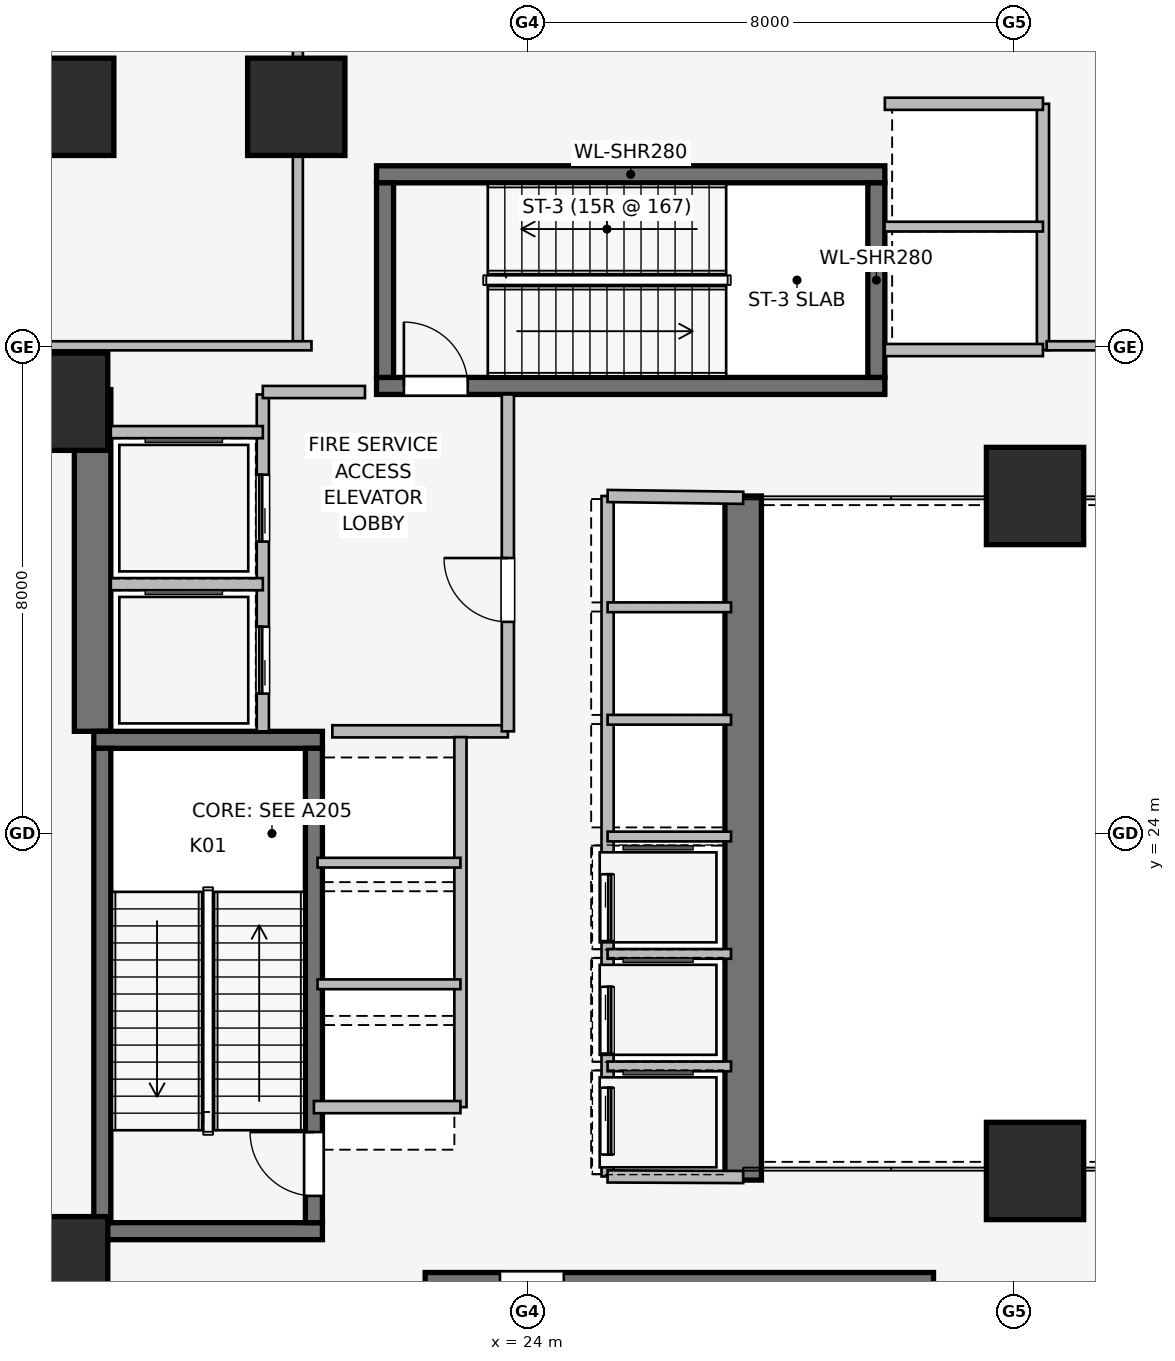
"""IFC4 building model, lengths in metres.
Left out: names, types, materials, properties, quantities, classifications, styles, units other than length and angle.
Written with IfcOpenShell. Run it as: python <this file> out.ifc"""

import sys

from ifc_helpers import new_model, si_unit, direction, frame, frame_2d, origin, origin_2d, place, context, subcontext, project, spatial, rectangle, extrude, element, fill, save


model = new_model("IFC4")
c1 = context("Model", 3, precision=1e-05, world=origin(), true_north=direction((0.0, 1.0)))
c2 = subcontext(c1, "Body", "Model", "MODEL_VIEW")
j1 = project(units=[si_unit("LENGTHUNIT", "METRE"), si_unit("PLANEANGLEUNIT", "RADIAN")], contexts=[c1])
p1 = place(None, origin())
s1 = spatial("IfcSite", under=j1, at=p1, CompositionType="ELEMENT")
p2 = place(p1, origin())
s2 = spatial("IfcBuilding", under=s1, at=p2, CompositionType="ELEMENT")
p3 = place(p2, frame((0.0, 0.0, 11.0)))
s3 = spatial("IfcBuildingStorey", under=s2, at=p3, CompositionType="ELEMENT", Elevation=11.0)
p4 = place(p3, frame((16.85, 25.68, 0.0), z_axis=(0.0, 0.0, 1.0), x_axis=(0.0, 1.0, 0.0)))
e1 = element("IfcWall", 1, at=p4, inside=s3, PredefinedType="SHEAR", context=c2, shape_type="SweptSolid", body=[
    extrude(rectangle(XDim=5.62, YDim=0.6, at=frame_2d((2.81, 0.0))), origin(), (0.0, 0.0, 1.0), 5.0),
])
p5 = place(p3, frame((27.55, 29.55, 0.0), z_axis=(0.0, 0.0, 1.0), x_axis=(0.0, -1.0, 0.0)))
e2 = element("IfcWall", 2, at=p5, inside=s3, PredefinedType="SHEAR", context=c2, shape_type="SweptSolid", body=[
    extrude(rectangle(XDim=11.25, YDim=0.6, at=frame_2d((5.625, 0.0))), origin(), (0.0, 0.0, 1.0), 5.0),
])
for number, where, z_axis, x_axis in (
    (3, (16.87, 17.46, 0.0), (0.0, 0.0, 1.0), (1.0, 0.0, 0.0)),
    (4, (20.63, 25.54, 0.0), (0.0, 0.0, 1.0), (-1.0, 0.0, 0.0)),
):
    element("IfcWall", number, at=place(p3, frame(where, z_axis=z_axis, x_axis=x_axis)), inside=s3, PredefinedType="SHEAR", context=c2, shape_type="SweptSolid", body=[
        extrude(rectangle(XDim=3.76, YDim=0.28, at=frame_2d((1.88, 0.0))), origin(), (0.0, 0.0, 1.0), 5.0),
    ])
p6 = place(p3, frame((17.01, 25.4, 0.0), z_axis=(0.0, 0.0, 1.0), x_axis=(0.0, -1.0, 0.0)))
e5 = element("IfcWall", 5, at=p6, inside=s3, PredefinedType="SHEAR", context=c2, shape_type="SweptSolid", body=[
    extrude(rectangle(XDim=7.8, YDim=0.28, at=frame_2d((3.9, 0.0))), origin(), (0.0, 0.0, 1.0), 5.0),
])
p7 = place(p3, frame((20.49, 17.6, 0.0), z_axis=(0.0, 0.0, 1.0), x_axis=(0.0, 1.0, 0.0)))
e6 = element("IfcWall", 6, at=p7, inside=s3, PredefinedType="SHEAR", context=c2, shape_type="SweptSolid", body=[
    extrude(rectangle(XDim=7.8, YDim=0.28, at=frame_2d((3.9, 0.0))), origin(), (0.0, 0.0, 1.0), 5.0),
])
p8 = place(p7, frame((0.44, 0.0, 0.0)))
e7 = element("IfcOpeningElement", 7, at=p8, cuts=e6, PredefinedType="OPENING", context=c2, shape_type="SweptSolid", body=[
    extrude(rectangle(XDim=1.05, YDim=2.0, at=frame_2d((0.525, 1.0))), frame((0.0, 0.15, 0.0), z_axis=(0.0, -1.0, 0.0), x_axis=(1.0, 0.0, 0.0)), (0.0, 0.0, 1.0), 0.3),
])
p9 = place(p3, frame((30.68, 16.64, 0.0), z_axis=(0.0, 0.0, 1.0), x_axis=(-1.0, 0.0, 0.0)))
e8 = element("IfcWall", 8, at=p9, inside=s3, PredefinedType="SHEAR", context=c2, shape_type="SweptSolid", body=[
    extrude(rectangle(XDim=8.36, YDim=0.28, at=frame_2d((4.18, 0.0))), origin(), (0.0, 0.0, 1.0), 5.0),
])
p10 = place(p9, frame((6.08, 0.0, 0.0)))
e9 = element("IfcOpeningElement", 9, at=p10, cuts=e8, PredefinedType="OPENING", context=c2, shape_type="SweptSolid", body=[
    extrude(rectangle(XDim=1.05, YDim=2.0, at=frame_2d((0.525, 1.0))), frame((0.0, 0.15, 0.0), z_axis=(0.0, -1.0, 0.0), x_axis=(1.0, 0.0, 0.0)), (0.0, 0.0, 1.0), 0.3),
])
p11 = place(p3, frame((21.52, 31.36, 0.0), z_axis=(0.0, 0.0, 1.0), x_axis=(1.0, 0.0, 0.0)))
e10 = element("IfcWall", 10, at=p11, inside=s3, PredefinedType="SHEAR", context=c2, shape_type="SweptSolid", body=[
    extrude(rectangle(XDim=8.36, YDim=0.28, at=frame_2d((4.18, 0.0))), origin(), (0.0, 0.0, 1.0), 5.0),
])
p12 = place(p11, frame((0.45, 0.0, 0.0)))
e11 = element("IfcOpeningElement", 11, at=p12, cuts=e10, PredefinedType="OPENING", context=c2, shape_type="SweptSolid", body=[
    extrude(rectangle(XDim=1.05, YDim=2.0, at=frame_2d((0.525, 1.0))), frame((0.0, 0.15, 0.0), z_axis=(0.0, -1.0, 0.0), x_axis=(1.0, 0.0, 0.0)), (0.0, 0.0, 1.0), 0.3),
])
p13 = place(p3, frame((29.88, 34.84, 0.0), z_axis=(0.0, 0.0, 1.0), x_axis=(-1.0, 0.0, 0.0)))
e12 = element("IfcWall", 12, at=p13, inside=s3, PredefinedType="SHEAR", context=c2, shape_type="SweptSolid", body=[
    extrude(rectangle(XDim=8.36, YDim=0.28, at=frame_2d((4.18, 0.0))), origin(), (0.0, 0.0, 1.0), 5.0),
])
for number, where, z_axis, x_axis in (
    (13, (21.66, 34.7, 0.0), (0.0, 0.0, 1.0), (0.0, -1.0, 0.0)),
    (14, (29.74, 31.5, 0.0), (0.0, 0.0, 1.0), (0.0, 1.0, 0.0)),
):
    element("IfcWall", number, at=place(p3, frame(where, z_axis=z_axis, x_axis=x_axis)), inside=s3, PredefinedType="SHEAR", context=c2, shape_type="SweptSolid", body=[
        extrude(rectangle(XDim=3.2, YDim=0.28, at=frame_2d((1.6, 0.0))), origin(), (0.0, 0.0, 1.0), 5.0),
    ])
for number, where, z_axis, x_axis in (
    (15, (16.3, 16.9, 0.0), (0.0, 0.0, 1.0), (1.0, 0.0, 0.0)),
    (16, (16.3, 31.1, 0.0), (0.0, 0.0, 1.0), (1.0, 0.0, 0.0)),
    (17, (32.35, 18.45, 0.0), (0.0, 0.0, 1.0), (1.0, 0.0, 0.0)),
    (18, (32.35, 29.55, 0.0), (0.0, 0.0, 1.0), (1.0, 0.0, 0.0)),
    (19, (20.2, 35.95, 0.0), (0.0, 0.0, 1.0), (1.0, 0.0, 0.0)),
    (20, (16.4, 35.95, 0.0), (0.0, 0.0, 1.0), (1.0, 0.0, 0.0)),
):
    element("IfcColumn", number, at=place(p3, frame(where, z_axis=z_axis, x_axis=x_axis)), inside=s3, PredefinedType="COLUMN", context=c2, shape_type="SweptSolid", body=[
        extrude(rectangle(XDim=1.6, YDim=1.6, at=origin_2d()), origin(), (0.0, 0.0, 1.0), 5.0),
    ])
p14 = place(p3, frame((19.65, 25.68, 0.0), z_axis=(0.0, 0.0, 1.0), x_axis=(0.0, 1.0, 0.0)))
e21 = element("IfcWall", 21, at=p14, inside=s3, PredefinedType="PARTITIONING", context=c2, shape_type="SweptSolid", body=[
    extrude(rectangle(XDim=5.54, YDim=0.2, at=frame_2d((2.77, 0.0))), origin(), (0.0, 0.0, 1.0), 4.69),
])
p15 = place(p14, frame((0.62, 0.0, 0.0)))
e22 = element("IfcOpeningElement", 22, at=p15, cuts=e21, PredefinedType="OPENING", context=c2, shape_type="SweptSolid", body=[
    extrude(rectangle(XDim=1.1, YDim=2.2, at=frame_2d((0.55, 1.1))), frame((0.0, 0.11, 0.0), z_axis=(0.0, -1.0, 0.0), x_axis=(1.0, 0.0, 0.0)), (0.0, 0.0, 1.0), 0.22),
])
p16 = place(p14, frame((3.12, 0.0, 0.0)))
e23 = element("IfcOpeningElement", 23, at=p16, cuts=e21, PredefinedType="OPENING", context=c2, shape_type="SweptSolid", body=[
    extrude(rectangle(XDim=1.1, YDim=2.2, at=frame_2d((0.55, 1.1))), frame((0.0, 0.11, 0.0), z_axis=(0.0, -1.0, 0.0), x_axis=(1.0, 0.0, 0.0)), (0.0, 0.0, 1.0), 0.22),
])
p17 = place(p3, frame((20.793, 25.68, 0.0), z_axis=(0.0, 0.0, 1.0), x_axis=(1.0, 0.0, 0.0)))
e24 = element("IfcWall", 24, at=p17, inside=s3, PredefinedType="PARTITIONING", context=c2, shape_type="SweptSolid", body=[
    extrude(rectangle(XDim=2.887, YDim=0.2, at=frame_2d((1.443, 0.0))), origin(), (0.0, 0.0, 1.0), 4.69),
])
p18 = place(p3, frame((23.68, 25.68, 0.0), z_axis=(0.0, 0.0, 1.0), x_axis=(0.0, 1.0, 0.0)))
e25 = element("IfcWall", 25, at=p18, inside=s3, PredefinedType="PARTITIONING", context=c2, shape_type="SweptSolid", body=[
    extrude(rectangle(XDim=5.54, YDim=0.2, at=frame_2d((2.77, 0.0))), origin(), (0.0, 0.0, 1.0), 4.69),
])
p19 = place(p18, frame((1.8, 0.0, 0.0)))
e26 = element("IfcOpeningElement", 26, at=p19, cuts=e25, PredefinedType="OPENING", context=c2, shape_type="SweptSolid", body=[
    extrude(rectangle(XDim=1.05, YDim=2.0, at=frame_2d((0.525, 1.0))), frame((0.0, 0.11, 0.0), z_axis=(0.0, -1.0, 0.0), x_axis=(1.0, 0.0, 0.0)), (0.0, 0.0, 1.0), 0.22),
])
p20 = place(p3, frame((21.33, 31.26, 0.0), z_axis=(0.0, 0.0, 1.0), x_axis=(-1.0, 0.0, 0.0)))
e27 = element("IfcWall", 27, at=p20, inside=s3, PredefinedType="PARTITIONING", context=c2, shape_type="SweptSolid", body=[
    extrude(rectangle(XDim=1.68, YDim=0.2, at=frame_2d((0.84, 0.0))), origin(), (0.0, 0.0, 1.0), 4.69),
])
p21 = place(p3, frame((17.15, 28.1, 0.0), z_axis=(0.0, 0.0, 1.0), x_axis=(1.0, 0.0, 0.0)))
e28 = element("IfcWall", 28, at=p21, inside=s3, PredefinedType="PARTITIONING", context=c2, shape_type="SweptSolid", body=[
    extrude(rectangle(XDim=2.5, YDim=0.2, at=frame_2d((1.25, 0.0))), origin(), (0.0, 0.0, 1.0), 4.69),
])
p22 = place(p3, frame((19.65, 30.6, 0.0), z_axis=(0.0, 0.0, 1.0), x_axis=(-1.0, 0.0, 0.0)))
e29 = element("IfcWall", 29, at=p22, inside=s3, PredefinedType="PARTITIONING", context=c2, shape_type="SweptSolid", body=[
    extrude(rectangle(XDim=2.5, YDim=0.2, at=frame_2d((1.25, 0.0))), origin(), (0.0, 0.0, 1.0), 3.59),
])
p23 = place(p3, frame((32.48, 31.95, 0.0), z_axis=(0.0, 0.0, 1.0), x_axis=(0.0, 1.0, 0.0)))
e30 = element("IfcWall", 30, at=p23, inside=s3, PredefinedType="PARTITIONING", context=c2, shape_type="SweptSolid", body=[
    extrude(rectangle(XDim=4.05, YDim=0.2, at=frame_2d((2.025, 0.0))), origin(), (0.0, 0.0, 1.0), 4.69),
])
p24 = place(p3, frame((29.88, 36.0, 0.0), z_axis=(0.0, 0.0, 1.0), x_axis=(1.0, 0.0, 0.0)))
e31 = element("IfcWall", 31, at=p24, inside=s3, PredefinedType="PARTITIONING", context=c2, shape_type="SweptSolid", body=[
    extrude(rectangle(XDim=2.6, YDim=0.2, at=frame_2d((1.3, 0.0))), origin(), (0.0, 0.0, 1.0), 3.742),
])
p25 = place(p3, frame((32.48, 31.95, 0.0), z_axis=(0.0, 0.0, 1.0), x_axis=(-1.0, 0.0, 0.0)))
e32 = element("IfcWall", 32, at=p25, inside=s3, PredefinedType="PARTITIONING", context=c2, shape_type="SweptSolid", body=[
    extrude(rectangle(XDim=2.6, YDim=0.2, at=frame_2d((1.3, 0.0))), origin(), (0.0, 0.0, 1.0), 4.69),
])
p26 = place(p3, frame((29.875, 33.98, 0.0), z_axis=(0.0, 0.0, 1.0), x_axis=(1.0, 0.0, 0.0)))
e33 = element("IfcWall", 33, at=p26, inside=s3, PredefinedType="PARTITIONING", context=c2, shape_type="SweptSolid", body=[
    extrude(rectangle(XDim=2.605, YDim=0.16, at=frame_2d((1.302, 0.0))), origin(), (0.0, 0.0, 1.0), 4.69),
])
p27 = place(p3, frame((22.9, 19.5, 0.0), z_axis=(0.0, 0.0, 1.0), x_axis=(0.0, 1.0, 0.0)))
e34 = element("IfcWall", 34, at=p27, inside=s3, PredefinedType="PARTITIONING", context=c2, shape_type="SweptSolid", body=[
    extrude(rectangle(XDim=6.085, YDim=0.2, at=frame_2d((3.042, 0.0))), origin(), (0.0, 0.0, 1.0), 4.69),
])
p28 = place(p3, frame((20.49, 19.5, 0.0), z_axis=(0.0, 0.0, 1.0), x_axis=(1.0, 0.0, 0.0)))
e35 = element("IfcWall", 35, at=p28, inside=s3, PredefinedType="PARTITIONING", context=c2, shape_type="SweptSolid", body=[
    extrude(rectangle(XDim=2.41, YDim=0.2, at=frame_2d((1.205, 0.0))), origin(), (0.0, 0.0, 1.0), 3.59),
])
for number, where, z_axis, x_axis in (
    (36, (20.55, 21.52, 0.0), (0.0, 0.0, 1.0), (1.0, 0.0, 0.0)),
    (37, (20.55, 23.52, 0.0), (0.0, 0.0, 1.0), (1.0, 0.0, 0.0)),
):
    element("IfcWall", number, at=place(p3, frame(where, z_axis=z_axis, x_axis=x_axis)), inside=s3, PredefinedType="PARTITIONING", context=c2, shape_type="SweptSolid", body=[
        extrude(rectangle(XDim=2.35, YDim=0.16, at=frame_2d((1.175, 0.0))), origin(), (0.0, 0.0, 1.0), 4.69),
    ])
p29 = place(p3, frame((25.32, 29.55, 0.0), z_axis=(0.0, 0.0, 1.0), x_axis=(0.0, -1.0, 0.0)))
e38 = element("IfcWall", 38, at=p29, inside=s3, PredefinedType="PARTITIONING", context=c2, shape_type="SweptSolid", body=[
    extrude(rectangle(XDim=11.19, YDim=0.2, at=frame_2d((5.595, 0.0))), origin(), (0.0, 0.0, 1.0), 4.69),
])
p30 = place(p29, frame((6.22, 0.0, 0.0)))
e39 = element("IfcOpeningElement", 39, at=p30, cuts=e38, PredefinedType="OPENING", context=c2, shape_type="SweptSolid", body=[
    extrude(rectangle(XDim=1.1, YDim=2.2, at=frame_2d((0.55, 1.1))), frame((0.0, 0.11, 0.0), z_axis=(0.0, -1.0, 0.0), x_axis=(1.0, 0.0, 0.0)), (0.0, 0.0, 1.0), 0.22),
])
p31 = place(p29, frame((8.07, 0.0, 0.0)))
e40 = element("IfcOpeningElement", 40, at=p31, cuts=e38, PredefinedType="OPENING", context=c2, shape_type="SweptSolid", body=[
    extrude(rectangle(XDim=1.1, YDim=2.2, at=frame_2d((0.55, 1.1))), frame((0.0, 0.11, 0.0), z_axis=(0.0, -1.0, 0.0), x_axis=(1.0, 0.0, 0.0)), (0.0, 0.0, 1.0), 0.22),
])
p32 = place(p29, frame((9.73, 0.0, 0.0)))
e41 = element("IfcOpeningElement", 41, at=p32, cuts=e38, PredefinedType="OPENING", context=c2, shape_type="SweptSolid", body=[
    extrude(rectangle(XDim=1.1, YDim=2.2, at=frame_2d((0.55, 1.1))), frame((0.0, 0.11, 0.0), z_axis=(0.0, -1.0, 0.0), x_axis=(1.0, 0.0, 0.0)), (0.0, 0.0, 1.0), 0.22),
])
p33 = place(p3, frame((25.32, 18.36, 0.0), z_axis=(0.0, 0.0, 1.0), x_axis=(0.999989925833, -0.004488678231, 0.0)))
e42 = element("IfcWall", 42, at=p33, inside=s3, PredefinedType="PARTITIONING", context=c2, shape_type="SweptSolid", body=[
    extrude(rectangle(XDim=2.23, YDim=0.2, at=frame_2d((1.115, 0.0))), origin(), (0.0, 0.0, 1.0), 4.69),
])
p34 = place(p3, frame((27.55, 29.52, 0.0), z_axis=(0.0, 0.0, 1.0), x_axis=(-0.999909343457, 0.013464949556, 0.0)))
e43 = element("IfcWall", 43, at=p34, inside=s3, PredefinedType="PARTITIONING", context=c2, shape_type="SweptSolid", body=[
    extrude(rectangle(XDim=2.23, YDim=0.2, at=frame_2d((1.115, 0.0))), origin(), (0.0, 0.0, 1.0), 3.59),
])
for number, where, z_axis, x_axis in (
    (44, (25.32, 20.17, 0.0), (0.0, 0.0, 1.0), (1.0, 0.0, 0.0)),
    (45, (25.32, 22.02, 0.0), (0.0, 0.0, 1.0), (1.0, 0.0, 0.0)),
    (46, (25.32, 23.95, 0.0), (0.0, 0.0, 1.0), (1.0, 0.0, 0.0)),
    (47, (25.32, 25.87, 0.0), (0.0, 0.0, 1.0), (1.0, 0.0, 0.0)),
    (48, (25.32, 27.72, 0.0), (0.0, 0.0, 1.0), (1.0, 0.0, 0.0)),
):
    element("IfcWall", number, at=place(p3, frame(where, z_axis=z_axis, x_axis=x_axis)), inside=s3, PredefinedType="PARTITIONING", context=c2, shape_type="SweptSolid", body=[
        extrude(rectangle(XDim=2.03, YDim=0.16, at=frame_2d((1.015, 0.0))), origin(), (0.0, 0.0, 1.0), 4.69),
    ])
p35 = place(p3, frame((20.226, 32.09, 0.0), z_axis=(0.0, 0.0, 1.0), x_axis=(0.0, 1.0, 0.0)))
e49 = element("IfcWall", 49, at=p35, inside=s3, PredefinedType="PARTITIONING", context=c2, shape_type="SweptSolid", body=[
    extrude(rectangle(XDim=15.54, YDim=0.165, at=frame_2d((7.77, 0.0))), origin(), (0.0, 0.0, 1.0), 4.69),
])
p36 = place(p3, frame((20.45, 32.02, 0.0), z_axis=(0.0, 0.0, 1.0), x_axis=(-1.0, 0.0, 0.0)))
e50 = element("IfcWall", 50, at=p36, inside=s3, PredefinedType="PARTITIONING", context=c2, shape_type="SweptSolid", body=[
    extrude(rectangle(XDim=20.055, YDim=0.15, at=frame_2d((10.027, 0.0))), origin(), (0.0, 0.0, 1.0), 3.742),
])
p37 = place(p36, frame((9.5, 0.0, 0.0)))
e51 = element("IfcOpeningElement", 51, at=p37, cuts=e50, PredefinedType="OPENING", context=c2, shape_type="SweptSolid", body=[
    extrude(rectangle(XDim=0.96, YDim=2.0, at=frame_2d((0.48, 1.0))), frame((0.0, 0.085, 0.0), z_axis=(0.0, -1.0, 0.0), x_axis=(1.0, 0.0, 0.0)), (0.0, 0.0, 1.0), 0.17),
])
p38 = place(p3, frame((40.187, 32.02, 0.0), z_axis=(0.0, 0.0, 1.0), x_axis=(-1.0, 0.0, 0.0)))
e52 = element("IfcWall", 52, at=p38, inside=s3, PredefinedType="PARTITIONING", context=c2, shape_type="SweptSolid", body=[
    extrude(rectangle(XDim=7.646, YDim=0.15, at=frame_2d((3.823, 0.0))), origin(), (0.0, 0.0, 1.0), 4.69),
])
p39 = place(p38, frame((3.343, 0.0, 0.0)))
e53 = element("IfcOpeningElement", 53, at=p39, cuts=e52, PredefinedType="OPENING", context=c2, shape_type="SweptSolid", body=[
    extrude(rectangle(XDim=0.96, YDim=2.0, at=frame_2d((0.48, 1.0))), frame((0.0, 0.085, 0.0), z_axis=(0.0, -1.0, 0.0), x_axis=(1.0, 0.0, 0.0)), (0.0, 0.0, 1.0), 0.17),
])
p40 = place(p8, origin())
e54 = element("IfcDoor", 54, at=p40, inside=s3, OperationType="SINGLE_SWING_RIGHT", PredefinedType="DOOR", context=c2, shape_type="SweptSolid", body=[
    extrude(rectangle(XDim=1.05, YDim=2.0, at=frame_2d((0.525, 1.0))), frame((0.0, 0.025, 0.0), z_axis=(0.0, -1.0, 0.0), x_axis=(1.0, 0.0, 0.0)), (0.0, 0.0, 1.0), 0.05),
])
fill(e7, e54)
p41 = place(p10, origin())
e55 = element("IfcDoor", 55, at=p41, inside=s3, OperationType="SINGLE_SWING_RIGHT", PredefinedType="DOOR", context=c2, shape_type="SweptSolid", body=[
    extrude(rectangle(XDim=1.05, YDim=2.0, at=frame_2d((0.525, 1.0))), frame((0.0, 0.025, 0.0), z_axis=(0.0, -1.0, 0.0), x_axis=(1.0, 0.0, 0.0)), (0.0, 0.0, 1.0), 0.05),
])
fill(e9, e55)
p42 = place(p12, origin())
e56 = element("IfcDoor", 56, at=p42, inside=s3, OperationType="SINGLE_SWING_LEFT", PredefinedType="DOOR", context=c2, shape_type="SweptSolid", body=[
    extrude(rectangle(XDim=1.05, YDim=2.0, at=frame_2d((0.525, 1.0))), frame((0.0, 0.025, 0.0), z_axis=(0.0, -1.0, 0.0), x_axis=(1.0, 0.0, 0.0)), (0.0, 0.0, 1.0), 0.05),
])
fill(e11, e56)
p43 = place(p15, origin())
e57 = element("IfcDoor", 57, at=p43, inside=s3, OperationType="SLIDING_TO_LEFT", PredefinedType="DOOR", context=c2, shape_type="SweptSolid", body=[
    extrude(rectangle(XDim=1.1, YDim=2.2, at=frame_2d((0.55, 1.1))), frame((0.0, 0.025, 0.0), z_axis=(0.0, -1.0, 0.0), x_axis=(1.0, 0.0, 0.0)), (0.0, 0.0, 1.0), 0.05),
])
fill(e22, e57)
p44 = place(p16, origin())
e58 = element("IfcDoor", 58, at=p44, inside=s3, OperationType="SLIDING_TO_LEFT", PredefinedType="DOOR", context=c2, shape_type="SweptSolid", body=[
    extrude(rectangle(XDim=1.1, YDim=2.2, at=frame_2d((0.55, 1.1))), frame((0.0, 0.025, 0.0), z_axis=(0.0, -1.0, 0.0), x_axis=(1.0, 0.0, 0.0)), (0.0, 0.0, 1.0), 0.05),
])
fill(e23, e58)
p45 = place(p19, origin())
e59 = element("IfcDoor", 59, at=p45, inside=s3, OperationType="SINGLE_SWING_RIGHT", PredefinedType="DOOR", context=c2, shape_type="SweptSolid", body=[
    extrude(rectangle(XDim=1.05, YDim=2.0, at=frame_2d((0.525, 1.0))), frame((0.0, 0.025, 0.0), z_axis=(0.0, -1.0, 0.0), x_axis=(1.0, 0.0, 0.0)), (0.0, 0.0, 1.0), 0.05),
])
fill(e26, e59)
p46 = place(p30, origin())
e60 = element("IfcDoor", 60, at=p46, inside=s3, OperationType="SLIDING_TO_LEFT", PredefinedType="DOOR", context=c2, shape_type="SweptSolid", body=[
    extrude(rectangle(XDim=1.1, YDim=2.2, at=frame_2d((0.55, 1.1))), frame((0.0, 0.025, 0.0), z_axis=(0.0, -1.0, 0.0), x_axis=(1.0, 0.0, 0.0)), (0.0, 0.0, 1.0), 0.05),
])
fill(e39, e60)
p47 = place(p31, origin())
e61 = element("IfcDoor", 61, at=p47, inside=s3, OperationType="SLIDING_TO_LEFT", PredefinedType="DOOR", context=c2, shape_type="SweptSolid", body=[
    extrude(rectangle(XDim=1.1, YDim=2.2, at=frame_2d((0.55, 1.1))), frame((0.0, 0.025, 0.0), z_axis=(0.0, -1.0, 0.0), x_axis=(1.0, 0.0, 0.0)), (0.0, 0.0, 1.0), 0.05),
])
fill(e40, e61)
p48 = place(p32, origin())
e62 = element("IfcDoor", 62, at=p48, inside=s3, OperationType="SLIDING_TO_LEFT", PredefinedType="DOOR", context=c2, shape_type="SweptSolid", body=[
    extrude(rectangle(XDim=1.1, YDim=2.2, at=frame_2d((0.55, 1.1))), frame((0.0, 0.025, 0.0), z_axis=(0.0, -1.0, 0.0), x_axis=(1.0, 0.0, 0.0)), (0.0, 0.0, 1.0), 0.05),
])
fill(e41, e62)
save(model, sys.argv[1])
